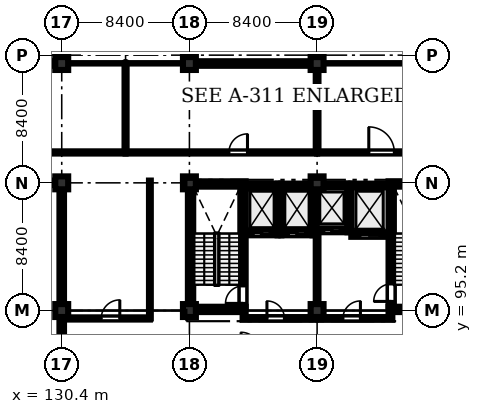
"""IFC4 building model, lengths in metres.
Left out: names, types, materials, properties, quantities, classifications, styles, units other than length and angle.
Written with IfcOpenShell. Run it as: python <this file> out.ifc"""

import sys

from ifc_helpers import new_model, si_unit, direction, frame, frame_2d, origin, origin_2d, place, context, subcontext, project, spatial, rectangle, extrude, element, fill, save


model = new_model("IFC4")
c1 = context("Model", 3, precision=1e-05, world=origin(), true_north=direction((0.0, 1.0)))
c2 = subcontext(c1, "Body", "Model", "MODEL_VIEW")
j1 = project(units=[si_unit("LENGTHUNIT", "METRE"), si_unit("PLANEANGLEUNIT", "RADIAN")], contexts=[c1])
p1 = place(None, origin())
s1 = spatial("IfcSite", under=j1, at=p1, CompositionType="ELEMENT")
p2 = place(p1, origin())
s2 = spatial("IfcBuilding", under=s1, at=p2, CompositionType="ELEMENT")
p3 = place(p2, frame((0.0, 0.0, 36.0)))
s3 = spatial("IfcBuildingStorey", under=s2, at=p3, CompositionType="ELEMENT", Elevation=36.0)
for number, where, z_axis, x_axis in (
    (1, (130.4, 95.2, 0.0), (0.0, 0.0, 1.0), (1.0, 0.0, 0.0)),
    (2, (130.4, 103.6, 0.0), (0.0, 0.0, 1.0), (1.0, 0.0, 0.0)),
    (3, (130.4, 111.45, 0.0), (0.0, 0.0, 1.0), (1.0, 0.0, 0.0)),
    (4, (138.8, 95.2, 0.0), (0.0, 0.0, 1.0), (1.0, 0.0, 0.0)),
    (5, (138.8, 103.6, 0.0), (0.0, 0.0, 1.0), (1.0, 0.0, 0.0)),
    (6, (138.8, 111.45, 0.0), (0.0, 0.0, 1.0), (1.0, 0.0, 0.0)),
    (7, (147.2, 95.2, 0.0), (0.0, 0.0, 1.0), (1.0, 0.0, 0.0)),
    (8, (147.2, 103.6, 0.0), (0.0, 0.0, 1.0), (1.0, 0.0, 0.0)),
    (9, (147.2, 111.45, 0.0), (0.0, 0.0, 1.0), (1.0, 0.0, 0.0)),
):
    element("IfcColumn", number, at=place(p3, frame(where, z_axis=z_axis, x_axis=x_axis)), inside=s3, PredefinedType="COLUMN", context=c2, shape_type="SweptSolid", body=[
        extrude(rectangle(XDim=0.85, YDim=0.85, at=origin_2d()), origin(), (0.0, 0.0, 1.0), 4.02),
    ])
for number, where, z_axis, x_axis in (
    (10, (138.7, 95.275, 0.0), (0.0, 0.0, 1.0), (1.0, 0.0, 0.0)),
    (11, (138.7, 103.525, 0.0), (0.0, 0.0, 1.0), (1.0, 0.0, 0.0)),
):
    element("IfcWall", number, at=place(p3, frame(where, z_axis=z_axis, x_axis=x_axis)), inside=s3, PredefinedType="SHEAR", context=c2, shape_type="SweptSolid", body=[
        extrude(rectangle(XDim=3.8, YDim=0.35, at=frame_2d((1.9, 0.0))), origin(), (0.0, 0.0, 1.0), 4.02),
    ])
p4 = place(p3, frame((138.875, 95.45, 0.0), z_axis=(0.0, 0.0, 1.0), x_axis=(0.0, 1.0, 0.0)))
e12 = element("IfcWall", 12, at=p4, inside=s3, PredefinedType="SHEAR", context=c2, shape_type="SweptSolid", body=[
    extrude(rectangle(XDim=7.9, YDim=0.35, at=frame_2d((3.95, 0.0))), origin(), (0.0, 0.0, 1.0), 4.02),
])
p5 = place(p3, frame((142.325, 95.45, 0.0), z_axis=(0.0, 0.0, 1.0), x_axis=(0.0, 1.0, 0.0)))
e13 = element("IfcWall", 13, at=p5, inside=s3, PredefinedType="SHEAR", context=c2, shape_type="SweptSolid", body=[
    extrude(rectangle(XDim=7.9, YDim=0.35, at=frame_2d((3.95, 0.0))), origin(), (0.0, 0.0, 1.0), 4.02),
])
p6 = place(p5, frame((0.22, 0.0, 0.0)))
e14 = element("IfcOpeningElement", 14, at=p6, cuts=e13, PredefinedType="OPENING", context=c2, shape_type="SweptSolid", body=[
    extrude(rectangle(XDim=1.15, YDim=2.15, at=frame_2d((0.575, 1.075))), frame((0.0, 0.185, 0.0), z_axis=(0.0, -1.0, 0.0), x_axis=(1.0, 0.0, 0.0)), (0.0, 0.0, 1.0), 0.37),
])
for number, where, z_axis, x_axis in (
    (15, (151.9, 95.275, 0.0), (0.0, 0.0, 1.0), (1.0, 0.0, 0.0)),
    (16, (151.9, 103.525, 0.0), (0.0, 0.0, 1.0), (1.0, 0.0, 0.0)),
):
    element("IfcWall", number, at=place(p3, frame(where, z_axis=z_axis, x_axis=x_axis)), inside=s3, PredefinedType="SHEAR", context=c2, shape_type="SweptSolid", body=[
        extrude(rectangle(XDim=3.8, YDim=0.35, at=frame_2d((1.9, 0.0))), origin(), (0.0, 0.0, 1.0), 4.02),
    ])
p7 = place(p3, frame((152.075, 95.45, 0.0), z_axis=(0.0, 0.0, 1.0), x_axis=(0.0, 1.0, 0.0)))
e17 = element("IfcWall", 17, at=p7, inside=s3, PredefinedType="SHEAR", context=c2, shape_type="SweptSolid", body=[
    extrude(rectangle(XDim=7.9, YDim=0.35, at=frame_2d((3.95, 0.0))), origin(), (0.0, 0.0, 1.0), 4.02),
])
p8 = place(p7, frame((0.35, 0.0, 0.0)))
e18 = element("IfcOpeningElement", 18, at=p8, cuts=e17, PredefinedType="OPENING", context=c2, shape_type="SweptSolid", body=[
    extrude(rectangle(XDim=1.15, YDim=2.15, at=frame_2d((0.575, 1.075))), frame((0.0, 0.185, 0.0), z_axis=(0.0, -1.0, 0.0), x_axis=(1.0, 0.0, 0.0)), (0.0, 0.0, 1.0), 0.37),
])
p9 = place(p3, frame((142.5, 100.275, 0.0), z_axis=(0.0, 0.0, 1.0), x_axis=(1.0, 0.0, 0.0)))
e19 = element("IfcWall", 19, at=p9, inside=s3, PredefinedType="SHEAR", context=c2, shape_type="SweptSolid", body=[
    extrude(rectangle(XDim=2.1, YDim=0.25, at=frame_2d((1.05, 0.0))), origin(), (0.0, 0.0, 1.0), 4.02),
])
p10 = place(p9, frame((0.5, 0.0, 0.0)))
e20 = element("IfcOpeningElement", 20, at=p10, cuts=e19, PredefinedType="OPENING", context=c2, shape_type="SweptSolid", body=[
    extrude(rectangle(XDim=1.1, YDim=2.15, at=frame_2d((0.55, 1.075))), frame((0.0, 0.135, 0.0), z_axis=(0.0, -1.0, 0.0), x_axis=(1.0, 0.0, 0.0)), (0.0, 0.0, 1.0), 0.27),
])
p11 = place(p3, frame((142.5, 103.425, 0.0), z_axis=(0.0, 0.0, 1.0), x_axis=(1.0, 0.0, 0.0)))
e21 = element("IfcWall", 21, at=p11, inside=s3, PredefinedType="SHEAR", context=c2, shape_type="SweptSolid", body=[
    extrude(rectangle(XDim=2.1, YDim=0.25, at=frame_2d((1.05, 0.0))), origin(), (0.0, 0.0, 1.0), 4.02),
])
p12 = place(p3, frame((144.725, 100.15, 0.0), z_axis=(0.0, 0.0, 1.0), x_axis=(0.0, 1.0, 0.0)))
e22 = element("IfcWall", 22, at=p12, inside=s3, PredefinedType="SHEAR", context=c2, shape_type="SweptSolid", body=[
    extrude(rectangle(XDim=3.4, YDim=0.25, at=frame_2d((1.7, 0.0))), origin(), (0.0, 0.0, 1.0), 4.02),
])
p13 = place(p3, frame((144.85, 100.275, 0.0), z_axis=(0.0, 0.0, 1.0), x_axis=(1.0, 0.0, 0.0)))
e23 = element("IfcWall", 23, at=p13, inside=s3, PredefinedType="SHEAR", context=c2, shape_type="SweptSolid", body=[
    extrude(rectangle(XDim=2.05, YDim=0.25, at=frame_2d((1.025, 0.0))), origin(), (0.0, 0.0, 1.0), 4.02),
])
p14 = place(p13, frame((0.465, 0.0, 0.0)))
e24 = element("IfcOpeningElement", 24, at=p14, cuts=e23, PredefinedType="OPENING", context=c2, shape_type="SweptSolid", body=[
    extrude(rectangle(XDim=1.12, YDim=2.15, at=frame_2d((0.56, 1.075))), frame((0.0, 0.135, 0.0), z_axis=(0.0, -1.0, 0.0), x_axis=(1.0, 0.0, 0.0)), (0.0, 0.0, 1.0), 0.27),
])
p15 = place(p3, frame((144.85, 103.425, 0.0), z_axis=(0.0, 0.0, 1.0), x_axis=(1.0, 0.0, 0.0)))
e25 = element("IfcWall", 25, at=p15, inside=s3, PredefinedType="SHEAR", context=c2, shape_type="SweptSolid", body=[
    extrude(rectangle(XDim=2.05, YDim=0.25, at=frame_2d((1.025, 0.0))), origin(), (0.0, 0.0, 1.0), 4.02),
])
p16 = place(p3, frame((147.025, 100.15, 0.0), z_axis=(0.0, 0.0, 1.0), x_axis=(0.0, 1.0, 0.0)))
e26 = element("IfcWall", 26, at=p16, inside=s3, PredefinedType="SHEAR", context=c2, shape_type="SweptSolid", body=[
    extrude(rectangle(XDim=3.4, YDim=0.25, at=frame_2d((1.7, 0.0))), origin(), (0.0, 0.0, 1.0), 4.02),
])
p17 = place(p3, frame((147.15, 100.475, 0.0), z_axis=(0.0, 0.0, 1.0), x_axis=(1.0, 0.0, 0.0)))
e27 = element("IfcWall", 27, at=p17, inside=s3, PredefinedType="SHEAR", context=c2, shape_type="SweptSolid", body=[
    extrude(rectangle(XDim=2.05, YDim=0.25, at=frame_2d((1.025, 0.0))), origin(), (0.0, 0.0, 1.0), 4.02),
])
p18 = place(p17, frame((0.495, 0.0, 0.0)))
e28 = element("IfcOpeningElement", 28, at=p18, cuts=e27, PredefinedType="OPENING", context=c2, shape_type="SweptSolid", body=[
    extrude(rectangle(XDim=1.06, YDim=2.15, at=frame_2d((0.53, 1.075))), frame((0.0, 0.135, 0.0), z_axis=(0.0, -1.0, 0.0), x_axis=(1.0, 0.0, 0.0)), (0.0, 0.0, 1.0), 0.27),
])
p19 = place(p3, frame((147.15, 103.425, 0.0), z_axis=(0.0, 0.0, 1.0), x_axis=(1.0, 0.0, 0.0)))
e29 = element("IfcWall", 29, at=p19, inside=s3, PredefinedType="SHEAR", context=c2, shape_type="SweptSolid", body=[
    extrude(rectangle(XDim=2.05, YDim=0.25, at=frame_2d((1.025, 0.0))), origin(), (0.0, 0.0, 1.0), 4.02),
])
p20 = place(p3, frame((149.325, 100.35, 0.0), z_axis=(0.0, 0.0, 1.0), x_axis=(0.0, 1.0, 0.0)))
e30 = element("IfcWall", 30, at=p20, inside=s3, PredefinedType="SHEAR", context=c2, shape_type="SweptSolid", body=[
    extrude(rectangle(XDim=3.2, YDim=0.25, at=frame_2d((1.6, 0.0))), origin(), (0.0, 0.0, 1.0), 4.02),
])
p21 = place(p3, frame((149.45, 100.175, 0.0), z_axis=(0.0, 0.0, 1.0), x_axis=(1.0, 0.0, 0.0)))
e31 = element("IfcWall", 31, at=p21, inside=s3, PredefinedType="SHEAR", context=c2, shape_type="SweptSolid", body=[
    extrude(rectangle(XDim=2.45, YDim=0.25, at=frame_2d((1.225, 0.0))), origin(), (0.0, 0.0, 1.0), 4.02),
])
p22 = place(p21, frame((0.575, 0.0, 0.0)))
e32 = element("IfcOpeningElement", 32, at=p22, cuts=e31, PredefinedType="OPENING", context=c2, shape_type="SweptSolid", body=[
    extrude(rectangle(XDim=1.3, YDim=2.25, at=frame_2d((0.65, 1.125))), frame((0.0, 0.135, 0.0), z_axis=(0.0, -1.0, 0.0), x_axis=(1.0, 0.0, 0.0)), (0.0, 0.0, 1.0), 0.27),
])
p23 = place(p3, frame((149.45, 103.425, 0.0), z_axis=(0.0, 0.0, 1.0), x_axis=(1.0, 0.0, 0.0)))
e33 = element("IfcWall", 33, at=p23, inside=s3, PredefinedType="SHEAR", context=c2, shape_type="SweptSolid", body=[
    extrude(rectangle(XDim=2.45, YDim=0.25, at=frame_2d((1.225, 0.0))), origin(), (0.0, 0.0, 1.0), 4.02),
])
p24 = place(p3, frame((122.375, 111.45, 0.0), z_axis=(0.0, 0.0, 1.0), x_axis=(1.0, 0.0, 0.0)))
e34 = element("IfcWall", 34, at=p24, inside=s3, PredefinedType="STANDARD", context=c2, shape_type="SweptSolid", body=[
    extrude(rectangle(XDim=7.6, YDim=0.3, at=frame_2d((3.8, 0.0))), origin(), (0.0, 0.0, 1.0), 3.32),
])
p25 = place(p24, frame((0.85, 0.0, 0.9)))
e35 = element("IfcOpeningElement", 35, at=p25, cuts=e34, PredefinedType="OPENING", context=c2, shape_type="SweptSolid", body=[
    extrude(rectangle(XDim=1.8, YDim=2.1, at=frame_2d((0.9, 1.05))), frame((0.0, 0.16, 0.0), z_axis=(0.0, -1.0, 0.0), x_axis=(1.0, 0.0, 0.0)), (0.0, 0.0, 1.0), 0.32),
])
p26 = place(p24, frame((4.65, 0.0, 0.9)))
e36 = element("IfcOpeningElement", 36, at=p26, cuts=e34, PredefinedType="OPENING", context=c2, shape_type="SweptSolid", body=[
    extrude(rectangle(XDim=1.8, YDim=2.1, at=frame_2d((0.9, 1.05))), frame((0.0, 0.16, 0.0), z_axis=(0.0, -1.0, 0.0), x_axis=(1.0, 0.0, 0.0)), (0.0, 0.0, 1.0), 0.32),
])
p27 = place(p3, frame((139.225, 111.45, 0.0), z_axis=(0.0, 0.0, 1.0), x_axis=(1.0, 0.0, 0.0)))
e37 = element("IfcWall", 37, at=p27, inside=s3, PredefinedType="STANDARD", context=c2, shape_type="SweptSolid", body=[
    extrude(rectangle(XDim=7.55, YDim=0.3, at=frame_2d((3.775, 0.0))), origin(), (0.0, 0.0, 1.0), 3.32),
])
p28 = place(p27, frame((0.85, 0.0, 0.9)))
e38 = element("IfcOpeningElement", 38, at=p28, cuts=e37, PredefinedType="OPENING", context=c2, shape_type="SweptSolid", body=[
    extrude(rectangle(XDim=1.8, YDim=2.1, at=frame_2d((0.9, 1.05))), frame((0.0, 0.16, 0.0), z_axis=(0.0, -1.0, 0.0), x_axis=(1.0, 0.0, 0.0)), (0.0, 0.0, 1.0), 0.32),
])
p29 = place(p27, frame((4.65, 0.0, 0.9)))
e39 = element("IfcOpeningElement", 39, at=p29, cuts=e37, PredefinedType="OPENING", context=c2, shape_type="SweptSolid", body=[
    extrude(rectangle(XDim=1.8, YDim=2.1, at=frame_2d((0.9, 1.05))), frame((0.0, 0.16, 0.0), z_axis=(0.0, -1.0, 0.0), x_axis=(1.0, 0.0, 0.0)), (0.0, 0.0, 1.0), 0.32),
])
p30 = place(p3, frame((130.4, 87.225, 0.0), z_axis=(0.0, 0.0, 1.0), x_axis=(0.0, 1.0, 0.0)))
e40 = element("IfcWall", 40, at=p30, inside=s3, PredefinedType="STANDARD", context=c2, shape_type="SweptSolid", body=[
    extrude(rectangle(XDim=7.55, YDim=0.3, at=frame_2d((3.775, 0.0))), origin(), (0.0, 0.0, 1.0), 3.32),
])
p31 = place(p30, frame((2.4, 0.0, 0.95)))
e41 = element("IfcOpeningElement", 41, at=p31, cuts=e40, PredefinedType="OPENING", context=c2, shape_type="SweptSolid", body=[
    extrude(rectangle(XDim=1.5, YDim=1.8, at=frame_2d((0.75, 0.9))), frame((0.0, 0.16, 0.0), z_axis=(0.0, -1.0, 0.0), x_axis=(1.0, 0.0, 0.0)), (0.0, 0.0, 1.0), 0.32),
])
p32 = place(p3, frame((130.4, 95.625, 0.0), z_axis=(0.0, 0.0, 1.0), x_axis=(0.0, 1.0, 0.0)))
e42 = element("IfcWall", 42, at=p32, inside=s3, PredefinedType="STANDARD", context=c2, shape_type="SweptSolid", body=[
    extrude(rectangle(XDim=7.55, YDim=0.3, at=frame_2d((3.775, 0.0))), origin(), (0.0, 0.0, 1.0), 3.32),
])
p33 = place(p32, frame((2.4, 0.0, 1.0)))
e43 = element("IfcOpeningElement", 43, at=p33, cuts=e42, PredefinedType="OPENING", context=c2, shape_type="SweptSolid", body=[
    extrude(rectangle(XDim=1.8, YDim=1.8, at=frame_2d((0.9, 0.9))), frame((0.0, 0.16, 0.0), z_axis=(0.0, -1.0, 0.0), x_axis=(1.0, 0.0, 0.0)), (0.0, 0.0, 1.0), 0.32),
])
p34 = place(p3, frame((129.975, 103.6, 0.0), z_axis=(0.0, 0.0, 1.0), x_axis=(-1.0, 0.0, 0.0)))
e44 = element("IfcWall", 44, at=p34, inside=s3, PredefinedType="STANDARD", context=c2, shape_type="SweptSolid", body=[
    extrude(rectangle(XDim=7.6, YDim=0.3, at=frame_2d((3.8, 0.0))), origin(), (0.0, 0.0, 1.0), 3.32),
])
p35 = place(p3, frame((142.3, 94.68, 0.0), z_axis=(0.0, 0.0, 1.0), x_axis=(1.0, 0.0, 0.0)))
e45 = element("IfcWall", 45, at=p35, inside=s3, PredefinedType="STANDARD", context=c2, shape_type="SweptSolid", body=[
    extrude(rectangle(XDim=4.8, YDim=0.18, at=frame_2d((2.4, 0.0))), origin(), (0.0, 0.0, 1.0), 4.02),
])
p36 = place(p35, frame((1.6, 0.0, 0.0)))
e46 = element("IfcOpeningElement", 46, at=p36, cuts=e45, PredefinedType="OPENING", context=c2, shape_type="SweptSolid", body=[
    extrude(rectangle(XDim=1.15, YDim=2.15, at=frame_2d((0.575, 1.075))), frame((0.0, 0.1, 0.0), z_axis=(0.0, -1.0, 0.0), x_axis=(1.0, 0.0, 0.0)), (0.0, 0.0, 1.0), 0.2),
])
p37 = place(p3, frame((147.3, 94.68, 0.0), z_axis=(0.0, 0.0, 1.0), x_axis=(1.0, 0.0, 0.0)))
e47 = element("IfcWall", 47, at=p37, inside=s3, PredefinedType="STANDARD", context=c2, shape_type="SweptSolid", body=[
    extrude(rectangle(XDim=4.85, YDim=0.18, at=frame_2d((2.425, 0.0))), origin(), (0.0, 0.0, 1.0), 4.02),
])
p38 = place(p37, frame((1.6, 0.0, 0.0)))
e48 = element("IfcOpeningElement", 48, at=p38, cuts=e47, PredefinedType="OPENING", context=c2, shape_type="SweptSolid", body=[
    extrude(rectangle(XDim=1.15, YDim=2.15, at=frame_2d((0.575, 1.075))), frame((0.0, 0.1, 0.0), z_axis=(0.0, -1.0, 0.0), x_axis=(1.0, 0.0, 0.0)), (0.0, 0.0, 1.0), 0.2),
])
p39 = place(p3, frame((147.2, 95.75, 0.0), z_axis=(0.0, 0.0, 1.0), x_axis=(0.0, 1.0, 0.0)))
e49 = element("IfcWall", 49, at=p39, inside=s3, PredefinedType="STANDARD", context=c2, shape_type="SweptSolid", body=[
    extrude(rectangle(XDim=4.5, YDim=0.18, at=frame_2d((2.25, 0.0))), origin(), (0.0, 0.0, 1.0), 3.32),
])
p40 = place(p3, frame((136.2, 94.68, 0.0), z_axis=(0.0, 0.0, 1.0), x_axis=(0.0, 1.0, 0.0)))
e50 = element("IfcWall", 50, at=p40, inside=s3, PredefinedType="PARTITIONING", context=c2, shape_type="SweptSolid", body=[
    extrude(rectangle(XDim=9.07, YDim=0.12, at=frame_2d((4.535, 0.0))), origin(), (0.0, 0.0, 1.0), 4.02),
])
p41 = place(p3, frame((130.8, 94.68, 0.0), z_axis=(0.0, 0.0, 1.0), x_axis=(1.0, 0.0, 0.0)))
e51 = element("IfcWall", 51, at=p41, inside=s3, PredefinedType="PARTITIONING", context=c2, shape_type="SweptSolid", body=[
    extrude(rectangle(XDim=5.4, YDim=0.145, at=frame_2d((2.7, 0.0))), origin(), (0.0, 0.0, 1.0), 4.02),
])
p42 = place(p41, frame((2.2, 0.0, 0.0)))
e52 = element("IfcOpeningElement", 52, at=p42, cuts=e51, PredefinedType="OPENING", context=c2, shape_type="SweptSolid", body=[
    extrude(rectangle(XDim=1.22, YDim=2.2, at=frame_2d((0.61, 1.1))), frame((0.0, 0.083, 0.0), z_axis=(0.0, -1.0, 0.0), x_axis=(1.0, 0.0, 0.0)), (0.0, 0.0, 1.0), 0.165),
])
p43 = place(p3, frame((122.15, 105.6, 0.0), z_axis=(0.0, 0.0, 1.0), x_axis=(1.0, 0.0, 0.0)))
e53 = element("IfcWall", 53, at=p43, inside=s3, PredefinedType="PARTITIONING", context=c2, shape_type="SweptSolid", body=[
    extrude(rectangle(XDim=12.45, YDim=0.145, at=frame_2d((6.225, 0.0))), origin(), (0.0, 0.0, 1.0), 4.02),
])
p44 = place(p43, frame((3.75, 0.0, 0.0)))
e54 = element("IfcOpeningElement", 54, at=p44, cuts=e53, PredefinedType="OPENING", context=c2, shape_type="SweptSolid", body=[
    extrude(rectangle(XDim=1.68, YDim=2.24, at=frame_2d((0.84, 1.12))), frame((0.0, 0.083, 0.0), z_axis=(0.0, -1.0, 0.0), x_axis=(1.0, 0.0, 0.0)), (0.0, 0.0, 1.0), 0.165),
])
p45 = place(p3, frame((134.6, 105.6, 0.0), z_axis=(0.0, 0.0, 1.0), x_axis=(1.0, 0.0, 0.0)))
e55 = element("IfcWall", 55, at=p45, inside=s3, PredefinedType="PARTITIONING", context=c2, shape_type="SweptSolid", body=[
    extrude(rectangle(XDim=12.6, YDim=0.145, at=frame_2d((6.3, 0.0))), origin(), (0.0, 0.0, 1.0), 4.02),
])
p46 = place(p45, frame((6.8, 0.0, 0.0)))
e56 = element("IfcOpeningElement", 56, at=p46, cuts=e55, PredefinedType="OPENING", context=c2, shape_type="SweptSolid", body=[
    extrude(rectangle(XDim=1.22, YDim=2.2, at=frame_2d((0.61, 1.1))), frame((0.0, 0.083, 0.0), z_axis=(0.0, -1.0, 0.0), x_axis=(1.0, 0.0, 0.0)), (0.0, 0.0, 1.0), 0.165),
])
p47 = place(p3, frame((134.6, 105.6, 0.0), z_axis=(0.0, 0.0, 1.0), x_axis=(0.0, 1.0, 0.0)))
e57 = element("IfcWall", 57, at=p47, inside=s3, PredefinedType="PARTITIONING", context=c2, shape_type="SweptSolid", body=[
    extrude(rectangle(XDim=5.75, YDim=0.135, at=frame_2d((2.875, 0.0))), origin(), (0.0, 0.0, 1.0), 3.52),
])
p48 = place(p3, frame((147.2, 105.6, 0.0), z_axis=(0.0, 0.0, 1.0), x_axis=(1.0, 0.0, 0.0)))
e58 = element("IfcWall", 58, at=p48, inside=s3, PredefinedType="PARTITIONING", context=c2, shape_type="SweptSolid", body=[
    extrude(rectangle(XDim=16.15, YDim=0.145, at=frame_2d((8.075, 0.0))), origin(), (0.0, 0.0, 1.0), 4.02),
])
p49 = place(p48, frame((3.4, 0.0, 0.0)))
e59 = element("IfcOpeningElement", 59, at=p49, cuts=e58, PredefinedType="OPENING", context=c2, shape_type="SweptSolid", body=[
    extrude(rectangle(XDim=1.68, YDim=2.24, at=frame_2d((0.84, 1.12))), frame((0.0, 0.083, 0.0), z_axis=(0.0, -1.0, 0.0), x_axis=(1.0, 0.0, 0.0)), (0.0, 0.0, 1.0), 0.165),
])
p50 = place(p3, frame((147.2, 105.6, 0.0), z_axis=(0.0, 0.0, 1.0), x_axis=(0.0, 1.0, 0.0)))
e60 = element("IfcWall", 60, at=p50, inside=s3, PredefinedType="STANDARD", context=c2, shape_type="SweptSolid", body=[
    extrude(rectangle(XDim=5.75, YDim=0.18, at=frame_2d((2.875, 0.0))), origin(), (0.0, 0.0, 1.0), 3.32),
])
p51 = place(p28, origin())
e61 = element("IfcWindow", 61, at=p51, inside=s3, PartitioningType="DOUBLE_PANEL_VERTICAL", PredefinedType="WINDOW", context=c2, shape_type="SweptSolid", body=[
    extrude(rectangle(XDim=1.8, YDim=2.1, at=frame_2d((0.9, 1.05))), frame((0.0, 0.03, 0.0), z_axis=(0.0, -1.0, 0.0), x_axis=(1.0, 0.0, 0.0)), (0.0, 0.0, 1.0), 0.06),
])
fill(e38, e61)
p52 = place(p29, origin())
e62 = element("IfcWindow", 62, at=p52, inside=s3, PartitioningType="DOUBLE_PANEL_VERTICAL", PredefinedType="WINDOW", context=c2, shape_type="SweptSolid", body=[
    extrude(rectangle(XDim=1.8, YDim=2.1, at=frame_2d((0.9, 1.05))), frame((0.0, 0.03, 0.0), z_axis=(0.0, -1.0, 0.0), x_axis=(1.0, 0.0, 0.0)), (0.0, 0.0, 1.0), 0.06),
])
fill(e39, e62)
p53 = place(p33, origin())
e63 = element("IfcWindow", 63, at=p53, inside=s3, PartitioningType="DOUBLE_PANEL_VERTICAL", PredefinedType="WINDOW", context=c2, shape_type="SweptSolid", body=[
    extrude(rectangle(XDim=1.8, YDim=1.8, at=frame_2d((0.9, 0.9))), frame((0.0, 0.03, 0.0), z_axis=(0.0, -1.0, 0.0), x_axis=(1.0, 0.0, 0.0)), (0.0, 0.0, 1.0), 0.06),
])
fill(e43, e63)
p54 = place(p36, origin())
e64 = element("IfcDoor", 64, at=p54, inside=s3, OperationType="SINGLE_SWING_LEFT", PredefinedType="DOOR", context=c2, shape_type="SweptSolid", body=[
    extrude(rectangle(XDim=1.15, YDim=2.15, at=frame_2d((0.575, 1.075))), frame((0.0, 0.025, 0.0), z_axis=(0.0, -1.0, 0.0), x_axis=(1.0, 0.0, 0.0)), (0.0, 0.0, 1.0), 0.05),
])
fill(e46, e64)
p55 = place(p38, origin())
e65 = element("IfcDoor", 65, at=p55, inside=s3, OperationType="SINGLE_SWING_RIGHT", PredefinedType="DOOR", context=c2, shape_type="SweptSolid", body=[
    extrude(rectangle(XDim=1.15, YDim=2.15, at=frame_2d((0.575, 1.075))), frame((0.0, 0.025, 0.0), z_axis=(0.0, -1.0, 0.0), x_axis=(1.0, 0.0, 0.0)), (0.0, 0.0, 1.0), 0.05),
])
fill(e48, e65)
p56 = place(p42, origin())
e66 = element("IfcDoor", 66, at=p56, inside=s3, OperationType="SINGLE_SWING_RIGHT", PredefinedType="DOOR", context=c2, shape_type="SweptSolid", body=[
    extrude(rectangle(XDim=1.22, YDim=2.2, at=frame_2d((0.61, 1.1))), frame((0.0, 0.025, 0.0), z_axis=(0.0, -1.0, 0.0), x_axis=(1.0, 0.0, 0.0)), (0.0, 0.0, 1.0), 0.05),
])
fill(e52, e66)
p57 = place(p46, origin())
e67 = element("IfcDoor", 67, at=p57, inside=s3, OperationType="SINGLE_SWING_RIGHT", PredefinedType="DOOR", context=c2, shape_type="SweptSolid", body=[
    extrude(rectangle(XDim=1.22, YDim=2.2, at=frame_2d((0.61, 1.1))), frame((0.0, 0.025, 0.0), z_axis=(0.0, -1.0, 0.0), x_axis=(1.0, 0.0, 0.0)), (0.0, 0.0, 1.0), 0.05),
])
fill(e56, e67)
p58 = place(p49, origin())
e68 = element("IfcDoor", 68, at=p58, inside=s3, OperationType="SINGLE_SWING_LEFT", PredefinedType="DOOR", context=c2, shape_type="SweptSolid", body=[
    extrude(rectangle(XDim=1.68, YDim=2.24, at=frame_2d((0.84, 1.12))), frame((0.0, 0.025, 0.0), z_axis=(0.0, -1.0, 0.0), x_axis=(1.0, 0.0, 0.0)), (0.0, 0.0, 1.0), 0.05),
])
fill(e59, e68)
p59 = place(p6, origin())
e69 = element("IfcDoor", 69, at=p59, inside=s3, OperationType="SINGLE_SWING_LEFT", PredefinedType="DOOR", context=c2, shape_type="SweptSolid", body=[
    extrude(rectangle(XDim=1.15, YDim=2.15, at=frame_2d((0.575, 1.075))), frame((0.0, 0.025, 0.0), z_axis=(0.0, -1.0, 0.0), x_axis=(1.0, 0.0, 0.0)), (0.0, 0.0, 1.0), 0.05),
])
fill(e14, e69)
p60 = place(p8, origin())
e70 = element("IfcDoor", 70, at=p60, inside=s3, OperationType="SINGLE_SWING_LEFT", PredefinedType="DOOR", context=c2, shape_type="SweptSolid", body=[
    extrude(rectangle(XDim=1.15, YDim=2.15, at=frame_2d((0.575, 1.075))), frame((0.0, 0.025, 0.0), z_axis=(0.0, -1.0, 0.0), x_axis=(1.0, 0.0, 0.0)), (0.0, 0.0, 1.0), 0.05),
])
fill(e18, e70)
p61 = place(p10, origin())
e71 = element("IfcDoor", 71, at=p61, inside=s3, OperationType="SLIDING_TO_LEFT", PredefinedType="DOOR", context=c2, shape_type="SweptSolid", body=[
    extrude(rectangle(XDim=1.1, YDim=2.15, at=frame_2d((0.55, 1.075))), frame((0.0, 0.025, 0.0), z_axis=(0.0, -1.0, 0.0), x_axis=(1.0, 0.0, 0.0)), (0.0, 0.0, 1.0), 0.05),
])
fill(e20, e71)
p62 = place(p14, origin())
e72 = element("IfcDoor", 72, at=p62, inside=s3, OperationType="SLIDING_TO_LEFT", PredefinedType="DOOR", context=c2, shape_type="SweptSolid", body=[
    extrude(rectangle(XDim=1.12, YDim=2.15, at=frame_2d((0.56, 1.075))), frame((0.0, 0.025, 0.0), z_axis=(0.0, -1.0, 0.0), x_axis=(1.0, 0.0, 0.0)), (0.0, 0.0, 1.0), 0.05),
])
fill(e24, e72)
p63 = place(p18, origin())
e73 = element("IfcDoor", 73, at=p63, inside=s3, OperationType="SLIDING_TO_LEFT", PredefinedType="DOOR", context=c2, shape_type="SweptSolid", body=[
    extrude(rectangle(XDim=1.06, YDim=2.15, at=frame_2d((0.53, 1.075))), frame((0.0, 0.025, 0.0), z_axis=(0.0, -1.0, 0.0), x_axis=(1.0, 0.0, 0.0)), (0.0, 0.0, 1.0), 0.05),
])
fill(e28, e73)
p64 = place(p22, origin())
e74 = element("IfcDoor", 74, at=p64, inside=s3, OperationType="SLIDING_TO_LEFT", PredefinedType="DOOR", context=c2, shape_type="SweptSolid", body=[
    extrude(rectangle(XDim=1.3, YDim=2.25, at=frame_2d((0.65, 1.125))), frame((0.0, 0.025, 0.0), z_axis=(0.0, -1.0, 0.0), x_axis=(1.0, 0.0, 0.0)), (0.0, 0.0, 1.0), 0.05),
])
fill(e32, e74)
save(model, sys.argv[1])
